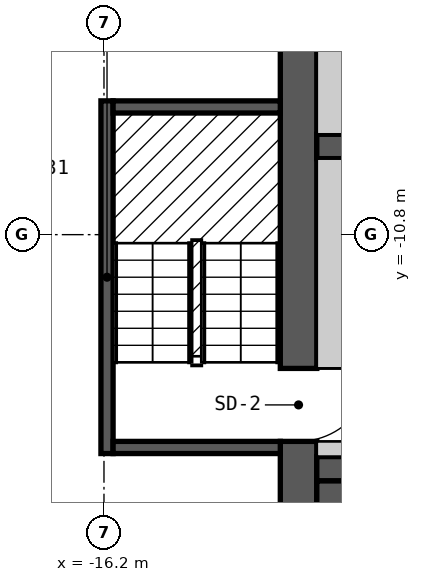
"""IFC4 building model, lengths in metres.
Left out: names, types, materials, properties, quantities, classifications, styles, units other than length and angle.
Written with IfcOpenShell. Run it as: python <this file> out.ifc"""

import sys

from ifc_helpers import new_model, si_unit, direction, frame, frame_2d, origin, origin_2d, place, context, subcontext, project, spatial, polyline, rectangle, outline, extrude, element, fill, save


model = new_model("IFC4")
c1 = context("Model", 3, precision=1e-05, world=origin(), true_north=direction((0.0, 1.0)))
c2 = subcontext(c1, "Body", "Model", "MODEL_VIEW")
j1 = project(units=[si_unit("LENGTHUNIT", "METRE"), si_unit("PLANEANGLEUNIT", "RADIAN")], contexts=[c1])
p1 = place(None, origin())
s1 = spatial("IfcSite", under=j1, at=p1, CompositionType="ELEMENT")
p2 = place(p1, origin())
s2 = spatial("IfcBuilding", under=s1, at=p2, CompositionType="ELEMENT")
p3 = place(p2, frame((0.0, 0.0, 181.2)))
s3 = spatial("IfcBuildingStorey", under=s2, at=p3, CompositionType="ELEMENT", Elevation=181.2)
p4 = place(p3, frame((-17.53, -15.736, 0.0), z_axis=(0.0, 0.0, 1.0), x_axis=(0.5, -0.866025403784, 0.0)))
e1 = element("IfcColumn", 1, at=p4, inside=s3, PredefinedType="COLUMN", context=c2, shape_type="SweptSolid", body=[
    extrude(rectangle(XDim=0.8, YDim=0.8, at=origin_2d()), origin(), (0.0, 0.0, 1.0), 3.0),
])
p5 = place(p3, frame((-13.0, -18.4, 0.0), z_axis=(0.0, 0.0, 1.0), x_axis=(0.0, 1.0, 0.0)))
e2 = element("IfcWall", 2, at=p5, inside=s3, PredefinedType="SHEAR", context=c2, shape_type="SweptSolid", body=[
    extrude(rectangle(XDim=12.8, YDim=0.6, at=frame_2d((6.4, 0.0))), origin(), (0.0, 0.0, 1.0), 2.7),
])
p6 = place(p5, frame((4.2, 0.0, 0.0)))
e3 = element("IfcOpeningElement", 3, at=p6, cuts=e2, PredefinedType="OPENING", context=c2, shape_type="SweptSolid", body=[
    extrude(rectangle(XDim=1.2, YDim=2.1, at=frame_2d((0.6, 1.05))), frame((0.0, 0.31, 0.0), z_axis=(0.0, -1.0, 0.0), x_axis=(1.0, 0.0, 0.0)), (0.0, 0.0, 1.0), 0.62),
])
p7 = place(p3, frame((-12.7, -14.65, 0.0), z_axis=(0.0, 0.0, 1.0), x_axis=(1.0, 0.0, 0.0)))
e4 = element("IfcWall", 4, at=p7, inside=s3, PredefinedType="SHEAR", context=c2, shape_type="SweptSolid", body=[
    extrude(rectangle(XDim=25.4, YDim=0.4, at=frame_2d((12.7, 0.0))), origin(), (0.0, 0.0, 1.0), 2.7),
])
p8 = place(p7, frame((1.9, 0.0, 0.0), z_axis=(0.0, 0.0, 1.0), x_axis=(-1.0, 0.0, 0.0)))
e5 = element("IfcOpeningElement", 5, at=p8, cuts=e4, PredefinedType="OPENING", context=c2, shape_type="SweptSolid", body=[
    extrude(rectangle(XDim=1.2, YDim=2.1, at=frame_2d((0.6, 1.05))), frame((0.0, 0.21, 0.0), z_axis=(0.0, -1.0, 0.0), x_axis=(1.0, 0.0, 0.0)), (0.0, 0.0, 1.0), 0.42),
])
p9 = place(p7, frame((24.75, 0.0, 0.0), z_axis=(0.0, 0.0, 1.0), x_axis=(-1.0, 0.0, 0.0)))
e6 = element("IfcOpeningElement", 6, at=p9, cuts=e4, PredefinedType="OPENING", context=c2, shape_type="SweptSolid", body=[
    extrude(rectangle(XDim=1.2, YDim=2.1, at=frame_2d((0.6, 1.05))), frame((0.0, 0.21, 0.0), z_axis=(0.0, -1.0, 0.0), x_axis=(1.0, 0.0, 0.0)), (0.0, 0.0, 1.0), 0.42),
])
p10 = place(p7, frame((9.85, 0.0, 0.0), z_axis=(0.0, 0.0, 1.0), x_axis=(-1.0, 0.0, 0.0)))
e7 = element("IfcOpeningElement", 7, at=p10, cuts=e4, PredefinedType="OPENING", context=c2, shape_type="SweptSolid", body=[
    extrude(rectangle(XDim=1.0, YDim=2.1, at=frame_2d((0.5, 1.05))), frame((0.0, 0.21, 0.0), z_axis=(0.0, -1.0, 0.0), x_axis=(1.0, 0.0, 0.0)), (0.0, 0.0, 1.0), 0.42),
])
p11 = place(p7, frame((16.25, 0.0, 0.0), z_axis=(0.0, 0.0, 1.0), x_axis=(-1.0, 0.0, 0.0)))
e8 = element("IfcOpeningElement", 8, at=p11, cuts=e4, PredefinedType="OPENING", context=c2, shape_type="SweptSolid", body=[
    extrude(rectangle(XDim=1.0, YDim=2.1, at=frame_2d((0.5, 1.05))), frame((0.0, 0.21, 0.0), z_axis=(0.0, -1.0, 0.0), x_axis=(1.0, 0.0, 0.0)), (0.0, 0.0, 1.0), 0.42),
])
p12 = place(p3, frame((-12.7, -9.35, 0.0), z_axis=(0.0, 0.0, 1.0), x_axis=(1.0, 0.0, 0.0)))
e9 = element("IfcWall", 9, at=p12, inside=s3, PredefinedType="SHEAR", context=c2, shape_type="SweptSolid", body=[
    extrude(rectangle(XDim=22.9, YDim=0.4, at=frame_2d((11.45, 0.0))), origin(), (0.0, 0.0, 1.0), 2.7),
])
p13 = place(p12, frame((1.3, 0.0, 0.0)))
e10 = element("IfcOpeningElement", 10, at=p13, cuts=e9, PredefinedType="OPENING", context=c2, shape_type="SweptSolid", body=[
    extrude(rectangle(XDim=1.1, YDim=2.1, at=frame_2d((0.55, 1.05))), frame((0.0, 0.21, 0.0), z_axis=(0.0, -1.0, 0.0), x_axis=(1.0, 0.0, 0.0)), (0.0, 0.0, 1.0), 0.42),
])
p14 = place(p12, frame((4.1, 0.0, 0.0)))
e11 = element("IfcOpeningElement", 11, at=p14, cuts=e9, PredefinedType="OPENING", context=c2, shape_type="SweptSolid", body=[
    extrude(rectangle(XDim=1.1, YDim=2.1, at=frame_2d((0.55, 1.05))), frame((0.0, 0.21, 0.0), z_axis=(0.0, -1.0, 0.0), x_axis=(1.0, 0.0, 0.0)), (0.0, 0.0, 1.0), 0.42),
])
p15 = place(p12, frame((6.9, 0.0, 0.0)))
e12 = element("IfcOpeningElement", 12, at=p15, cuts=e9, PredefinedType="OPENING", context=c2, shape_type="SweptSolid", body=[
    extrude(rectangle(XDim=1.1, YDim=2.1, at=frame_2d((0.55, 1.05))), frame((0.0, 0.21, 0.0), z_axis=(0.0, -1.0, 0.0), x_axis=(1.0, 0.0, 0.0)), (0.0, 0.0, 1.0), 0.42),
])
p16 = place(p12, frame((9.2, 0.0, 0.0)))
e13 = element("IfcOpeningElement", 13, at=p16, cuts=e9, PredefinedType="OPENING", context=c2, shape_type="SweptSolid", body=[
    extrude(rectangle(XDim=1.1, YDim=2.1, at=frame_2d((0.55, 1.05))), frame((0.0, 0.21, 0.0), z_axis=(0.0, -1.0, 0.0), x_axis=(1.0, 0.0, 0.0)), (0.0, 0.0, 1.0), 0.42),
])
p17 = place(p12, frame((11.5, 0.0, 0.0)))
e14 = element("IfcOpeningElement", 14, at=p17, cuts=e9, PredefinedType="OPENING", context=c2, shape_type="SweptSolid", body=[
    extrude(rectangle(XDim=1.1, YDim=2.1, at=frame_2d((0.55, 1.05))), frame((0.0, 0.21, 0.0), z_axis=(0.0, -1.0, 0.0), x_axis=(1.0, 0.0, 0.0)), (0.0, 0.0, 1.0), 0.42),
])
p18 = place(p12, frame((13.8, 0.0, 0.0)))
e15 = element("IfcOpeningElement", 15, at=p18, cuts=e9, PredefinedType="OPENING", context=c2, shape_type="SweptSolid", body=[
    extrude(rectangle(XDim=1.1, YDim=2.1, at=frame_2d((0.55, 1.05))), frame((0.0, 0.21, 0.0), z_axis=(0.0, -1.0, 0.0), x_axis=(1.0, 0.0, 0.0)), (0.0, 0.0, 1.0), 0.42),
])
p19 = place(p12, frame((16.1, 0.0, 0.0)))
e16 = element("IfcOpeningElement", 16, at=p19, cuts=e9, PredefinedType="OPENING", context=c2, shape_type="SweptSolid", body=[
    extrude(rectangle(XDim=1.1, YDim=2.1, at=frame_2d((0.55, 1.05))), frame((0.0, 0.21, 0.0), z_axis=(0.0, -1.0, 0.0), x_axis=(1.0, 0.0, 0.0)), (0.0, 0.0, 1.0), 0.42),
])
p20 = place(p12, frame((18.4, 0.0, 0.0)))
e17 = element("IfcOpeningElement", 17, at=p20, cuts=e9, PredefinedType="OPENING", context=c2, shape_type="SweptSolid", body=[
    extrude(rectangle(XDim=1.1, YDim=2.1, at=frame_2d((0.55, 1.05))), frame((0.0, 0.21, 0.0), z_axis=(0.0, -1.0, 0.0), x_axis=(1.0, 0.0, 0.0)), (0.0, 0.0, 1.0), 0.42),
])
p21 = place(p12, frame((20.8, 0.0, 0.0)))
e18 = element("IfcOpeningElement", 18, at=p21, cuts=e9, PredefinedType="OPENING", context=c2, shape_type="SweptSolid", body=[
    extrude(rectangle(XDim=1.1, YDim=2.1, at=frame_2d((0.55, 1.05))), frame((0.0, 0.21, 0.0), z_axis=(0.0, -1.0, 0.0), x_axis=(1.0, 0.0, 0.0)), (0.0, 0.0, 1.0), 0.42),
])
p22 = place(p3, frame((-26.024, -3.025, 0.0), z_axis=(0.0, 0.0, 1.0), x_axis=(0.500018670445, -0.86601462413, 0.0)))
e19 = element("IfcWall", 19, at=p22, inside=s3, PredefinedType="SOLIDWALL", context=c2, shape_type="SweptSolid", body=[
    extrude(outline(polyline([(0.0, -0.15), (20.785, -0.15), (20.705, 0.15), (0.08, 0.15), (0.0, -0.15)])), origin(), (0.0, 0.0, 1.0), 2.7),
])
p23 = place(p22, frame((2.346, 0.0, 0.15)))
e20 = element("IfcOpeningElement", 20, at=p23, cuts=e19, PredefinedType="OPENING", context=c2, shape_type="SweptSolid", body=[
    extrude(rectangle(XDim=1.5, YDim=2.1, at=frame_2d((0.75, 1.05))), frame((0.0, 0.16, 0.0), z_axis=(0.0, -1.0, 0.0), x_axis=(1.0, 0.0, 0.0)), (0.0, 0.0, 1.0), 0.32),
])
p24 = place(p22, frame((7.21, 0.0, 0.15)))
e21 = element("IfcOpeningElement", 21, at=p24, cuts=e19, PredefinedType="OPENING", context=c2, shape_type="SweptSolid", body=[
    extrude(rectangle(XDim=1.5, YDim=2.1, at=frame_2d((0.75, 1.05))), frame((0.0, 0.16, 0.0), z_axis=(0.0, -1.0, 0.0), x_axis=(1.0, 0.0, 0.0)), (0.0, 0.0, 1.0), 0.32),
])
p25 = place(p22, frame((12.073, 0.0, 0.15)))
e22 = element("IfcOpeningElement", 22, at=p25, cuts=e19, PredefinedType="OPENING", context=c2, shape_type="SweptSolid", body=[
    extrude(rectangle(XDim=1.5, YDim=2.1, at=frame_2d((0.75, 1.05))), frame((0.0, 0.16, 0.0), z_axis=(0.0, -1.0, 0.0), x_axis=(1.0, 0.0, 0.0)), (0.0, 0.0, 1.0), 0.32),
])
p26 = place(p22, frame((16.938, 0.0, 0.15)))
e23 = element("IfcOpeningElement", 23, at=p26, cuts=e19, PredefinedType="OPENING", context=c2, shape_type="SweptSolid", body=[
    extrude(rectangle(XDim=1.5, YDim=2.1, at=frame_2d((0.75, 1.05))), frame((0.0, 0.16, 0.0), z_axis=(0.0, -1.0, 0.0), x_axis=(1.0, 0.0, 0.0)), (0.0, 0.0, 1.0), 0.32),
])
p27 = place(p3, frame((-23.13, -7.737, 0.0), z_axis=(0.0, 0.0, 1.0), x_axis=(0.86598451299, 0.500070818246, 0.0)))
e24 = element("IfcWall", 24, at=p27, inside=s3, PredefinedType="PARTITIONING", context=c2, shape_type="SweptSolid", body=[
    extrude(rectangle(XDim=8.695, YDim=0.2, at=frame_2d((4.348, 0.0))), origin(), (0.0, 0.0, 1.0), 2.7),
])
p28 = place(p3, frame((-16.15, -14.4, 0.0), z_axis=(0.0, 0.0, 1.0), x_axis=(0.0, 1.0, 0.0)))
e25 = element("IfcWall", 25, at=p28, inside=s3, PredefinedType="SOLIDWALL", context=c2, shape_type="SweptSolid", body=[
    extrude(rectangle(XDim=5.8, YDim=0.2, at=frame_2d((2.9, 0.0))), origin(), (0.0, 0.0, 1.0), 2.7),
])
for number, where, z_axis, x_axis in (
    (26, (-16.05, -14.3, 0.0), (0.0, 0.0, 1.0), (1.0, 0.0, 0.0)),
    (27, (-16.05, -8.7, 0.0), (0.0, 0.0, 1.0), (1.0, 0.0, 0.0)),
):
    element("IfcWall", number, at=place(p3, frame(where, z_axis=z_axis, x_axis=x_axis)), inside=s3, PredefinedType="SOLIDWALL", context=c2, shape_type="SweptSolid", body=[
        extrude(rectangle(XDim=2.75, YDim=0.2, at=frame_2d((1.375, 0.0))), origin(), (0.0, 0.0, 1.0), 2.7),
    ])
p29 = place(p3, frame((-12.4, -18.4, 0.0), z_axis=(0.0, 0.0, 1.0), x_axis=(0.0, 1.0, 0.0)))
e28 = element("IfcWall", 28, at=p29, inside=s3, PredefinedType="SOLIDWALL", context=c2, shape_type="SweptSolid", body=[
    extrude(rectangle(XDim=3.55, YDim=0.6, at=frame_2d((1.775, 0.0))), origin(), (0.0, 0.0, 1.0), 2.7),
])
p30 = place(p3, frame((-12.7, -14.325, 0.0), z_axis=(0.0, 0.0, 1.0), x_axis=(1.0, 0.0, 0.0)))
e29 = element("IfcWall", 29, at=p30, inside=s3, PredefinedType="PARTITIONING", context=c2, shape_type="SweptSolid", body=[
    extrude(rectangle(XDim=0.6, YDim=0.25, at=frame_2d((0.3, 0.0))), origin(), (0.0, 0.0, 1.0), 2.7),
])
p31 = place(p3, frame((-12.4, -13.0, 0.0), z_axis=(0.0, 0.0, 1.0), x_axis=(0.0, 1.0, 0.0)))
e30 = element("IfcWall", 30, at=p31, inside=s3, PredefinedType="PARTITIONING", context=c2, shape_type="SweptSolid", body=[
    extrude(rectangle(XDim=3.45, YDim=0.6, at=frame_2d((1.725, 0.0))), origin(), (0.0, 0.0, 1.0), 2.7),
])
p32 = place(p3, frame((-12.4, -9.15, 0.0), z_axis=(0.0, 0.0, 1.0), x_axis=(0.0, 1.0, 0.0)))
e31 = element("IfcWall", 31, at=p32, inside=s3, PredefinedType="SOLIDWALL", context=c2, shape_type="SweptSolid", body=[
    extrude(rectangle(XDim=3.55, YDim=0.6, at=frame_2d((1.775, 0.0))), origin(), (0.0, 0.0, 1.0), 2.7),
])
p33 = place(p6, origin())
e32 = element("IfcDoor", 32, at=p33, inside=s3, OperationType="SINGLE_SWING_RIGHT", PredefinedType="DOOR", context=c2, shape_type="SweptSolid", body=[
    extrude(rectangle(XDim=1.2, YDim=2.1, at=frame_2d((0.6, 1.05))), frame((0.0, 0.025, 0.0), z_axis=(0.0, -1.0, 0.0), x_axis=(1.0, 0.0, 0.0)), (0.0, 0.0, 1.0), 0.05),
])
fill(e3, e32)
save(model, sys.argv[1])
